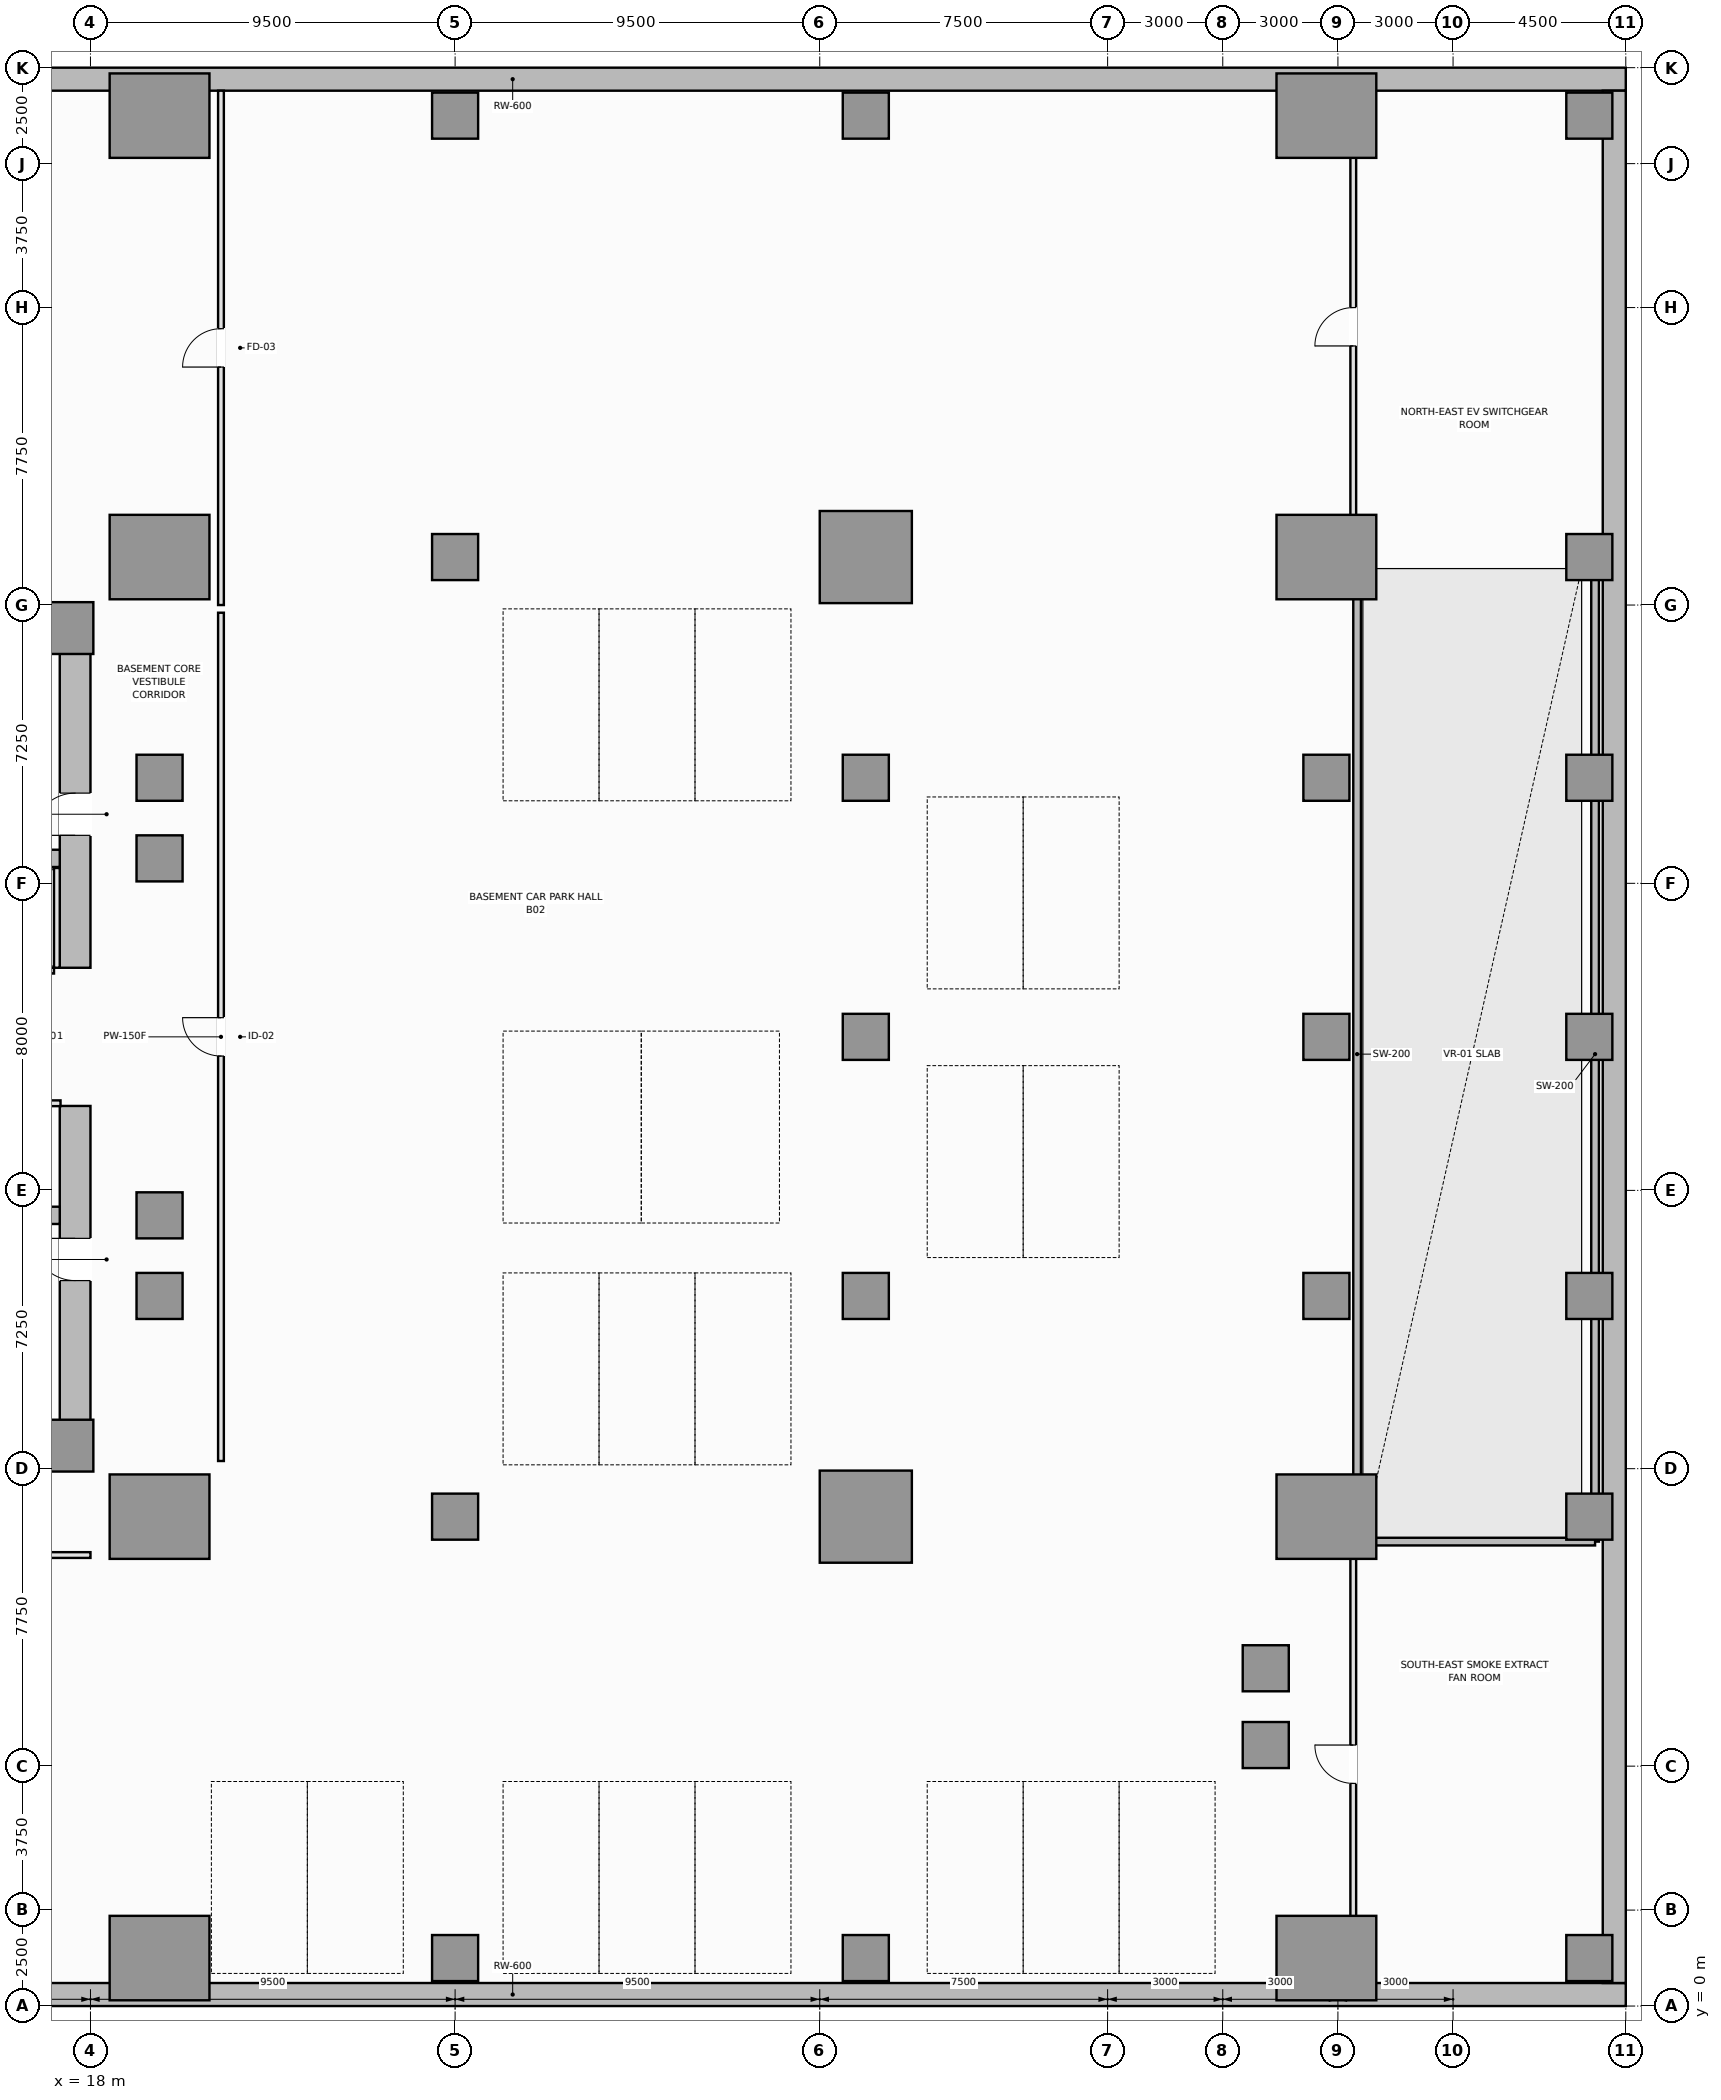
"""IFC4 building model, lengths in metres.
Left out: names, types, materials, properties, quantities, classifications, styles, units other than length and angle.
Written with IfcOpenShell. Run it as: python <this file> out.ifc"""

import sys

from ifc_helpers import new_model, si_unit, direction, frame, frame_2d, origin, origin_2d, place, context, subcontext, project, spatial, rectangle, extrude, element, fill, save


model = new_model("IFC4")
c1 = context("Model", 3, precision=1e-05, world=origin(), true_north=direction((0.0, 1.0)))
c2 = subcontext(c1, "Body", "Model", "MODEL_VIEW")
j1 = project(units=[si_unit("LENGTHUNIT", "METRE"), si_unit("PLANEANGLEUNIT", "RADIAN")], contexts=[c1])
p1 = place(None, origin())
s1 = spatial("IfcSite", under=j1, at=p1, CompositionType="ELEMENT")
p2 = place(p1, origin())
s2 = spatial("IfcBuilding", under=s1, at=p2, CompositionType="ELEMENT")
p3 = place(p2, frame((0.0, 0.0, -9.0)))
s3 = spatial("IfcBuildingStorey", under=s2, at=p3, CompositionType="ELEMENT", Elevation=-9.0)
for number, where, z_axis, x_axis in (
    (1, (0.0, 0.3, 0.0), (0.0, 0.0, 1.0), (1.0, 0.0, 0.0)),
    (2, (0.0, 50.2, 0.0), (0.0, 0.0, 1.0), (1.0, 0.0, 0.0)),
):
    element("IfcWall", number, at=place(p3, frame(where, z_axis=z_axis, x_axis=x_axis)), inside=s3, PredefinedType="USERDEFINED", context=c2, shape_type="SweptSolid", body=[
        extrude(rectangle(XDim=58.0, YDim=0.6, at=frame_2d((29.0, 0.0))), origin(), (0.0, 0.0, 1.0), 4.2),
    ])
p4 = place(p3, frame((57.7, 0.6, 0.0), z_axis=(0.0, 0.0, 1.0), x_axis=(0.0, 1.0, 0.0)))
e3 = element("IfcWall", 3, at=p4, inside=s3, PredefinedType="USERDEFINED", context=c2, shape_type="SweptSolid", body=[
    extrude(rectangle(XDim=49.3, YDim=0.6, at=frame_2d((24.65, 0.0))), origin(), (0.0, 0.0, 1.0), 4.2),
])
for number, where, z_axis, x_axis in (
    (4, (4.5, 14.4, 0.0), (0.0, 0.0, 1.0), (1.0, 0.0, 0.0)),
    (5, (4.5, 36.1, 0.0), (0.0, 0.0, 1.0), (1.0, 0.0, 0.0)),
):
    element("IfcWall", number, at=place(p3, frame(where, z_axis=z_axis, x_axis=x_axis)), inside=s3, PredefinedType="SHEAR", context=c2, shape_type="SweptSolid", body=[
        extrude(rectangle(XDim=13.5, YDim=0.8, at=frame_2d((6.75, 0.0))), origin(), (0.0, 0.0, 1.0), 4.2),
    ])
p5 = place(p3, frame((17.6, 14.8, 0.0), z_axis=(0.0, 0.0, 1.0), x_axis=(0.0, 1.0, 0.0)))
e6 = element("IfcWall", 6, at=p5, inside=s3, PredefinedType="SHEAR", context=c2, shape_type="SweptSolid", body=[
    extrude(rectangle(XDim=8.65, YDim=0.8, at=frame_2d((4.325, 0.0))), origin(), (0.0, 0.0, 1.0), 4.2),
])
p6 = place(p5, frame((4.1, 0.0, 0.0)))
e7 = element("IfcOpeningElement", 7, at=p6, cuts=e6, PredefinedType="OPENING", context=c2, shape_type="SweptSolid", body=[
    extrude(rectangle(XDim=1.1, YDim=2.15, at=frame_2d((0.55, 1.075))), frame((0.0, 0.41, 0.0), z_axis=(0.0, -1.0, 0.0), x_axis=(1.0, 0.0, 0.0)), (0.0, 0.0, 1.0), 0.82),
])
p7 = place(p3, frame((17.6, 27.05, 0.0), z_axis=(0.0, 0.0, 1.0), x_axis=(0.0, 1.0, 0.0)))
e8 = element("IfcWall", 8, at=p7, inside=s3, PredefinedType="SHEAR", context=c2, shape_type="SweptSolid", body=[
    extrude(rectangle(XDim=8.65, YDim=0.8, at=frame_2d((4.325, 0.0))), origin(), (0.0, 0.0, 1.0), 4.2),
])
p8 = place(p7, frame((3.45, 0.0, 0.0)))
e9 = element("IfcOpeningElement", 9, at=p8, cuts=e8, PredefinedType="OPENING", context=c2, shape_type="SweptSolid", body=[
    extrude(rectangle(XDim=1.1, YDim=2.15, at=frame_2d((0.55, 1.075))), frame((0.0, 0.41, 0.0), z_axis=(0.0, -1.0, 0.0), x_axis=(1.0, 0.0, 0.0)), (0.0, 0.0, 1.0), 0.82),
])
for number, where, z_axis, x_axis in (
    (10, (5.3, 20.6, 0.0), (0.0, 0.0, 1.0), (1.0, 0.0, 0.0)),
    (11, (5.3, 29.9, 0.0), (0.0, 0.0, 1.0), (1.0, 0.0, 0.0)),
):
    element("IfcWall", number, at=place(p3, frame(where, z_axis=z_axis, x_axis=x_axis)), inside=s3, PredefinedType="SHEAR", context=c2, shape_type="SweptSolid", body=[
        extrude(rectangle(XDim=11.9, YDim=0.45, at=frame_2d((5.95, 0.0))), origin(), (0.0, 0.0, 1.0), 4.2),
    ])
for number, where, z_axis, x_axis in (
    (12, (17.4, 14.6, 0.0), (0.0, 0.0, 1.0), (1.0, 0.0, 0.0)),
    (13, (17.4, 35.9, 0.0), (0.0, 0.0, 1.0), (1.0, 0.0, 0.0)),
):
    element("IfcColumn", number, at=place(p3, frame(where, z_axis=z_axis, x_axis=x_axis)), inside=s3, PredefinedType="PILASTER", context=c2, shape_type="SweptSolid", body=[
        extrude(rectangle(XDim=1.35, YDim=1.35, at=origin_2d()), origin(), (0.0, 0.0, 1.0), 4.2),
    ])
for number, where, z_axis, x_axis in (
    (14, (38.2, 12.75, 0.0), (0.0, 0.0, 1.0), (1.0, 0.0, 0.0)),
    (15, (38.2, 37.75, 0.0), (0.0, 0.0, 1.0), (1.0, 0.0, 0.0)),
):
    element("IfcColumn", number, at=place(p3, frame(where, z_axis=z_axis, x_axis=x_axis)), inside=s3, PredefinedType="COLUMN", context=c2, shape_type="SweptSolid", body=[
        extrude(rectangle(XDim=2.4, YDim=2.4, at=origin_2d()), origin(), (0.0, 0.0, 1.0), 4.2),
    ])
for number, where, z_axis, x_axis in (
    (16, (27.5, 12.75, 0.0), (0.0, 0.0, 1.0), (1.0, 0.0, 0.0)),
    (17, (27.5, 37.75, 0.0), (0.0, 0.0, 1.0), (1.0, 0.0, 0.0)),
    (18, (38.2, 18.5, 0.0), (0.0, 0.0, 1.0), (1.0, 0.0, 0.0)),
    (19, (38.2, 25.25, 0.0), (0.0, 0.0, 1.0), (1.0, 0.0, 0.0)),
    (20, (38.2, 32.0, 0.0), (0.0, 0.0, 1.0), (1.0, 0.0, 0.0)),
):
    element("IfcColumn", number, at=place(p3, frame(where, z_axis=z_axis, x_axis=x_axis)), inside=s3, PredefinedType="COLUMN", context=c2, shape_type="SweptSolid", body=[
        extrude(rectangle(XDim=1.2, YDim=1.2, at=origin_2d()), origin(), (0.0, 0.0, 1.0), 4.2),
    ])
for number, where, z_axis, x_axis in (
    (21, (19.8, 1.25, 0.0), (0.0, 0.0, 1.0), (1.0, 0.0, 0.0)),
    (22, (50.2, 1.25, 0.0), (0.0, 0.0, 1.0), (1.0, 0.0, 0.0)),
    (23, (19.8, 12.75, 0.0), (0.0, 0.0, 1.0), (1.0, 0.0, 0.0)),
    (24, (50.2, 12.75, 0.0), (0.0, 0.0, 1.0), (1.0, 0.0, 0.0)),
    (25, (19.8, 37.75, 0.0), (0.0, 0.0, 1.0), (1.0, 0.0, 0.0)),
    (26, (50.2, 37.75, 0.0), (0.0, 0.0, 1.0), (1.0, 0.0, 0.0)),
    (27, (19.8, 49.25, 0.0), (0.0, 0.0, 1.0), (1.0, 0.0, 0.0)),
    (28, (50.2, 49.25, 0.0), (0.0, 0.0, 1.0), (1.0, 0.0, 0.0)),
):
    element("IfcColumn", number, at=place(p3, frame(where, z_axis=z_axis, x_axis=x_axis)), inside=s3, PredefinedType="COLUMN", context=c2, shape_type="SweptSolid", body=[
        extrude(rectangle(XDim=2.6, YDim=2.2, at=origin_2d()), origin(), (0.0, 0.0, 1.0), 4.2),
    ])
for number, where, z_axis, x_axis in (
    (29, (19.8, 18.5, 0.0), (0.0, 0.0, 1.0), (1.0, 0.0, 0.0)),
    (30, (19.8, 20.6, 0.0), (0.0, 0.0, 1.0), (1.0, 0.0, 0.0)),
    (31, (19.8, 29.9, 0.0), (0.0, 0.0, 1.0), (1.0, 0.0, 0.0)),
    (32, (19.8, 32.0, 0.0), (0.0, 0.0, 1.0), (1.0, 0.0, 0.0)),
    (33, (50.2, 18.5, 0.0), (0.0, 0.0, 1.0), (1.0, 0.0, 0.0)),
    (34, (50.2, 25.25, 0.0), (0.0, 0.0, 1.0), (1.0, 0.0, 0.0)),
    (35, (50.2, 32.0, 0.0), (0.0, 0.0, 1.0), (1.0, 0.0, 0.0)),
    (36, (57.05, 1.25, 0.0), (0.0, 0.0, 1.0), (1.0, 0.0, 0.0)),
    (37, (57.05, 12.75, 0.0), (0.0, 0.0, 1.0), (1.0, 0.0, 0.0)),
    (38, (57.05, 18.5, 0.0), (0.0, 0.0, 1.0), (1.0, 0.0, 0.0)),
    (39, (57.05, 25.25, 0.0), (0.0, 0.0, 1.0), (1.0, 0.0, 0.0)),
    (40, (57.05, 32.0, 0.0), (0.0, 0.0, 1.0), (1.0, 0.0, 0.0)),
    (41, (57.05, 37.75, 0.0), (0.0, 0.0, 1.0), (1.0, 0.0, 0.0)),
    (42, (57.05, 49.25, 0.0), (0.0, 0.0, 1.0), (1.0, 0.0, 0.0)),
    (43, (48.62, 6.8, 0.0), (0.0, 0.0, 1.0), (1.0, 0.0, 0.0)),
    (44, (48.62, 8.8, 0.0), (0.0, 0.0, 1.0), (1.0, 0.0, 0.0)),
    (45, (27.5, 1.25, 0.0), (0.0, 0.0, 1.0), (1.0, 0.0, 0.0)),
    (46, (38.2, 1.25, 0.0), (0.0, 0.0, 1.0), (1.0, 0.0, 0.0)),
    (47, (27.5, 49.25, 0.0), (0.0, 0.0, 1.0), (1.0, 0.0, 0.0)),
    (48, (38.2, 49.25, 0.0), (0.0, 0.0, 1.0), (1.0, 0.0, 0.0)),
):
    element("IfcColumn", number, at=place(p3, frame(where, z_axis=z_axis, x_axis=x_axis)), inside=s3, PredefinedType="COLUMN", context=c2, shape_type="SweptSolid", body=[
        extrude(rectangle(XDim=1.2, YDim=1.2, at=origin_2d()), origin(), (0.0, 0.0, 1.0), 4.2),
    ])
p9 = place(p3, frame((14.5, 26.975, 0.0), z_axis=(0.0, 0.0, 1.0), x_axis=(1.0, 0.0, 0.0)))
e49 = element("IfcWall", 49, at=p9, inside=s3, PredefinedType="PARTITIONING", context=c2, shape_type="SweptSolid", body=[
    extrude(rectangle(XDim=2.55, YDim=0.15, at=frame_2d((1.275, 0.0))), origin(), (0.0, 0.0, 1.0), 4.0),
])
p10 = place(p9, frame((0.625, 0.0, 0.0)))
e50 = element("IfcOpeningElement", 50, at=p10, cuts=e49, PredefinedType="OPENING", context=c2, shape_type="SweptSolid", body=[
    extrude(rectangle(XDim=1.3, YDim=2.2, at=frame_2d((0.65, 1.1))), frame((0.0, 0.085, 0.0), z_axis=(0.0, -1.0, 0.0), x_axis=(1.0, 0.0, 0.0)), (0.0, 0.0, 1.0), 0.17),
])
p11 = place(p3, frame((17.125, 27.05, 0.0), z_axis=(0.0, 0.0, 1.0), x_axis=(0.0, 1.0, 0.0)))
e51 = element("IfcWall", 51, at=p11, inside=s3, PredefinedType="PARTITIONING", context=c2, shape_type="SweptSolid", body=[
    extrude(rectangle(XDim=2.6, YDim=0.15, at=frame_2d((1.3, 0.0))), origin(), (0.0, 0.0, 1.0), 4.0),
])
for number, where, z_axis, x_axis in (
    (52, (51.0, 12.1, 0.0), (0.0, 0.0, 1.0), (0.0, 1.0, 0.0)),
    (53, (57.2, 12.1, 0.0), (0.0, 0.0, 1.0), (0.0, 1.0, 0.0)),
):
    element("IfcWall", number, at=place(p3, frame(where, z_axis=z_axis, x_axis=x_axis)), inside=s3, PredefinedType="SOLIDWALL", context=c2, shape_type="SweptSolid", body=[
        extrude(rectangle(XDim=25.4, YDim=0.2, at=frame_2d((12.7, 0.0))), origin(), (0.0, 0.0, 1.0), 4.2),
    ])
p12 = place(p3, frame((51.0, 12.1, 0.0), z_axis=(0.0, 0.0, 1.0), x_axis=(1.0, 0.0, 0.0)))
e54 = element("IfcWall", 54, at=p12, inside=s3, PredefinedType="SOLIDWALL", context=c2, shape_type="SweptSolid", body=[
    extrude(rectangle(XDim=6.2, YDim=0.2, at=frame_2d((3.1, 0.0))), origin(), (0.0, 0.0, 1.0), 4.2),
])
p13 = place(p3, frame((14.38, 23.52, 0.0), z_axis=(0.0, 0.0, 1.0), x_axis=(1.0, 0.0, 0.0)))
e55 = element("IfcWall", 55, at=p13, inside=s3, PredefinedType="PARTITIONING", context=c2, shape_type="SweptSolid", body=[
    extrude(rectangle(XDim=2.84, YDim=0.15, at=frame_2d((1.42, 0.0))), origin(), (0.0, 0.0, 1.0), 4.0),
])
p14 = place(p13, frame((1.027, 0.0, 0.0)))
e56 = element("IfcOpeningElement", 56, at=p14, cuts=e55, PredefinedType="OPENING", context=c2, shape_type="SweptSolid", body=[
    extrude(rectangle(XDim=0.9, YDim=2.1, at=frame_2d((0.45, 1.05))), frame((0.0, 0.085, 0.0), z_axis=(0.0, -1.0, 0.0), x_axis=(1.0, 0.0, 0.0)), (0.0, 0.0, 1.0), 0.17),
])
p15 = place(p3, frame((21.4, 14.2, 0.0), z_axis=(0.0, 0.0, 1.0), x_axis=(0.0, 1.0, 0.0)))
e57 = element("IfcWall", 57, at=p15, inside=s3, PredefinedType="PARTITIONING", context=c2, shape_type="SweptSolid", body=[
    extrude(rectangle(XDim=22.1, YDim=0.15, at=frame_2d((11.05, 0.0))), origin(), (0.0, 0.0, 1.0), 4.0),
])
p16 = place(p15, frame((10.55, 0.0, 0.0)))
e58 = element("IfcOpeningElement", 58, at=p16, cuts=e57, PredefinedType="OPENING", context=c2, shape_type="SweptSolid", body=[
    extrude(rectangle(XDim=1.0, YDim=2.15, at=frame_2d((0.5, 1.075))), frame((0.0, 0.085, 0.0), z_axis=(0.0, -1.0, 0.0), x_axis=(1.0, 0.0, 0.0)), (0.0, 0.0, 1.0), 0.17),
])
p17 = place(p3, frame((4.52, 11.75, 0.0), z_axis=(0.0, 0.0, 1.0), x_axis=(1.0, 0.0, 0.0)))
e59 = element("IfcWall", 59, at=p17, inside=s3, PredefinedType="PARTITIONING", context=c2, shape_type="SweptSolid", body=[
    extrude(rectangle(XDim=13.48, YDim=0.15, at=frame_2d((6.74, 0.0))), origin(), (0.0, 0.0, 1.0), 4.0),
])
p18 = place(p17, frame((7.961, 0.0, 0.0)))
e60 = element("IfcOpeningElement", 60, at=p18, cuts=e59, PredefinedType="OPENING", context=c2, shape_type="SweptSolid", body=[
    extrude(rectangle(XDim=1.0, YDim=2.15, at=frame_2d((0.5, 1.075))), frame((0.0, 0.085, 0.0), z_axis=(0.0, -1.0, 0.0), x_axis=(1.0, 0.0, 0.0)), (0.0, 0.0, 1.0), 0.17),
])
p19 = place(p3, frame((21.4, 36.5, 0.0), z_axis=(0.0, 0.0, 1.0), x_axis=(0.0, 1.0, 0.0)))
e61 = element("IfcWall", 61, at=p19, inside=s3, PredefinedType="PARTITIONING", context=c2, shape_type="SweptSolid", body=[
    extrude(rectangle(XDim=13.4, YDim=0.15, at=frame_2d((6.7, 0.0))), origin(), (0.0, 0.0, 1.0), 4.0),
])
p20 = place(p19, frame((6.2, 0.0, 0.0)))
e62 = element("IfcOpeningElement", 62, at=p20, cuts=e61, PredefinedType="OPENING", context=c2, shape_type="SweptSolid", body=[
    extrude(rectangle(XDim=1.0, YDim=2.15, at=frame_2d((0.5, 1.075))), frame((0.0, 0.085, 0.0), z_axis=(0.0, -1.0, 0.0), x_axis=(1.0, 0.0, 0.0)), (0.0, 0.0, 1.0), 0.17),
])
p21 = place(p3, frame((50.9, 0.6, 0.0), z_axis=(0.0, 0.0, 1.0), x_axis=(0.0, 1.0, 0.0)))
e63 = element("IfcWall", 63, at=p21, inside=s3, PredefinedType="PARTITIONING", context=c2, shape_type="SweptSolid", body=[
    extrude(rectangle(XDim=11.4, YDim=0.15, at=frame_2d((5.7, 0.0))), origin(), (0.0, 0.0, 1.0), 4.0),
])
p22 = place(p21, frame((5.2, 0.0, 0.0)))
e64 = element("IfcOpeningElement", 64, at=p22, cuts=e63, PredefinedType="OPENING", context=c2, shape_type="SweptSolid", body=[
    extrude(rectangle(XDim=1.0, YDim=2.15, at=frame_2d((0.5, 1.075))), frame((0.0, 0.085, 0.0), z_axis=(0.0, -1.0, 0.0), x_axis=(1.0, 0.0, 0.0)), (0.0, 0.0, 1.0), 0.17),
])
p23 = place(p3, frame((50.9, 37.6, 0.0), z_axis=(0.0, 0.0, 1.0), x_axis=(0.0, 1.0, 0.0)))
e65 = element("IfcWall", 65, at=p23, inside=s3, PredefinedType="PARTITIONING", context=c2, shape_type="SweptSolid", body=[
    extrude(rectangle(XDim=12.3, YDim=0.15, at=frame_2d((6.15, 0.0))), origin(), (0.0, 0.0, 1.0), 4.0),
])
p24 = place(p23, frame((5.65, 0.0, 0.0)))
e66 = element("IfcOpeningElement", 66, at=p24, cuts=e65, PredefinedType="OPENING", context=c2, shape_type="SweptSolid", body=[
    extrude(rectangle(XDim=1.0, YDim=2.15, at=frame_2d((0.5, 1.075))), frame((0.0, 0.085, 0.0), z_axis=(0.0, -1.0, 0.0), x_axis=(1.0, 0.0, 0.0)), (0.0, 0.0, 1.0), 0.17),
])
p25 = place(p6, origin())
e67 = element("IfcDoor", 67, at=p25, inside=s3, OperationType="SINGLE_SWING_RIGHT", PredefinedType="DOOR", context=c2, shape_type="SweptSolid", body=[
    extrude(rectangle(XDim=1.1, YDim=2.15, at=frame_2d((0.55, 1.075))), frame((0.0, 0.025, 0.0), z_axis=(0.0, -1.0, 0.0), x_axis=(1.0, 0.0, 0.0)), (0.0, 0.0, 1.0), 0.05),
])
fill(e7, e67)
p26 = place(p8, origin())
e68 = element("IfcDoor", 68, at=p26, inside=s3, OperationType="SINGLE_SWING_LEFT", PredefinedType="DOOR", context=c2, shape_type="SweptSolid", body=[
    extrude(rectangle(XDim=1.1, YDim=2.15, at=frame_2d((0.55, 1.075))), frame((0.0, 0.025, 0.0), z_axis=(0.0, -1.0, 0.0), x_axis=(1.0, 0.0, 0.0)), (0.0, 0.0, 1.0), 0.05),
])
fill(e9, e68)
p27 = place(p16, origin())
e69 = element("IfcDoor", 69, at=p27, inside=s3, OperationType="SINGLE_SWING_RIGHT", PredefinedType="DOOR", context=c2, shape_type="SweptSolid", body=[
    extrude(rectangle(XDim=1.0, YDim=2.15, at=frame_2d((0.5, 1.075))), frame((0.0, 0.025, 0.0), z_axis=(0.0, -1.0, 0.0), x_axis=(1.0, 0.0, 0.0)), (0.0, 0.0, 1.0), 0.05),
])
fill(e58, e69)
p28 = place(p20, origin())
e70 = element("IfcDoor", 70, at=p28, inside=s3, OperationType="SINGLE_SWING_LEFT", PredefinedType="DOOR", context=c2, shape_type="SweptSolid", body=[
    extrude(rectangle(XDim=1.0, YDim=2.15, at=frame_2d((0.5, 1.075))), frame((0.0, 0.025, 0.0), z_axis=(0.0, -1.0, 0.0), x_axis=(1.0, 0.0, 0.0)), (0.0, 0.0, 1.0), 0.05),
])
fill(e62, e70)
p29 = place(p22, origin())
e71 = element("IfcDoor", 71, at=p29, inside=s3, OperationType="SINGLE_SWING_RIGHT", PredefinedType="DOOR", context=c2, shape_type="SweptSolid", body=[
    extrude(rectangle(XDim=1.0, YDim=2.15, at=frame_2d((0.5, 1.075))), frame((0.0, 0.025, 0.0), z_axis=(0.0, -1.0, 0.0), x_axis=(1.0, 0.0, 0.0)), (0.0, 0.0, 1.0), 0.05),
])
fill(e64, e71)
p30 = place(p24, origin())
e72 = element("IfcDoor", 72, at=p30, inside=s3, OperationType="SINGLE_SWING_LEFT", PredefinedType="DOOR", context=c2, shape_type="SweptSolid", body=[
    extrude(rectangle(XDim=1.0, YDim=2.15, at=frame_2d((0.5, 1.075))), frame((0.0, 0.025, 0.0), z_axis=(0.0, -1.0, 0.0), x_axis=(1.0, 0.0, 0.0)), (0.0, 0.0, 1.0), 0.05),
])
fill(e66, e72)
save(model, sys.argv[1])
